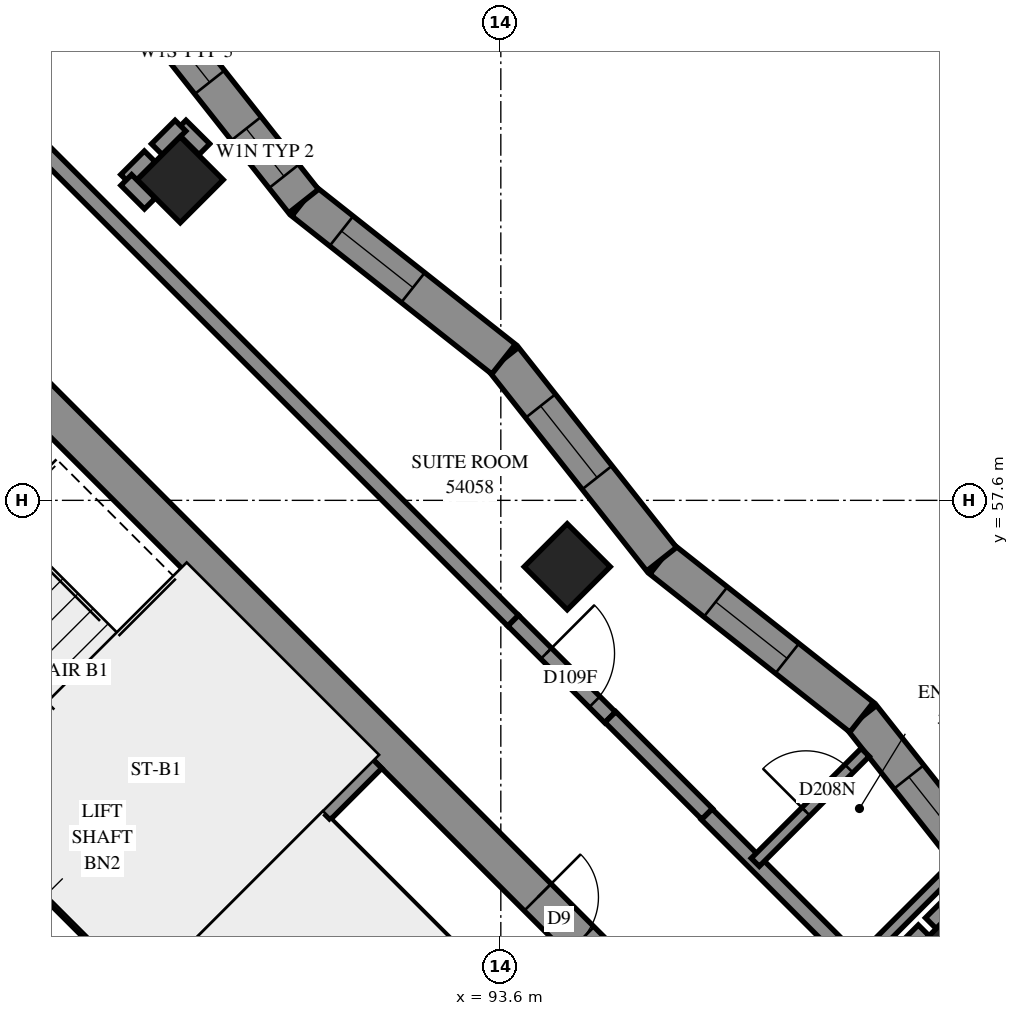
"""IFC4 building model, lengths in metres.
Left out: names, types, materials, properties, quantities, classifications, styles, units other than length and angle.
Written with IfcOpenShell. Run it as: python <this file> out.ifc"""

import sys

from ifc_helpers import new_model, si_unit, direction, frame, frame_2d, origin, origin_2d, place, context, subcontext, project, spatial, polyline, rectangle, outline, extrude, element, fill, save


model = new_model("IFC4")
c1 = context("Model", 3, precision=1e-05, world=origin(), true_north=direction((0.0, 1.0)))
c2 = subcontext(c1, "Body", "Model", "MODEL_VIEW")
j1 = project(units=[si_unit("LENGTHUNIT", "METRE"), si_unit("PLANEANGLEUNIT", "RADIAN")], contexts=[c1])
p1 = place(None, origin())
s1 = spatial("IfcSite", under=j1, at=p1, CompositionType="ELEMENT")
p2 = place(p1, origin())
s2 = spatial("IfcBuilding", under=s1, at=p2, CompositionType="ELEMENT")
p3 = place(p2, frame((0.0, 0.0, 199.8)))
s3 = spatial("IfcBuildingStorey", under=s2, at=p3, CompositionType="ELEMENT", Elevation=199.8)
for number, where, z_axis, x_axis in (
    (1, (89.382, 61.818, 0.0), (0.0, 0.0, 1.0), (0.707, -0.707, 0.0)),
    (2, (94.474, 56.727, 0.0), (0.0, 0.0, 1.0), (0.707, -0.707, 0.0)),
    (3, (99.565, 51.635, 0.0), (0.0, 0.0, 1.0), (0.707, -0.707, 0.0)),
):
    element("IfcColumn", number, at=place(p3, frame(where, z_axis=z_axis, x_axis=x_axis)), inside=s3, PredefinedType="COLUMN", context=c2, shape_type="SweptSolid", body=[
        extrude(rectangle(XDim=0.8, YDim=0.8, at=origin_2d()), origin(), (0.0, 0.0, 1.0), 3.1),
    ])
p4 = place(p3, frame((86.66, 59.802, -0.3), z_axis=(0.0, 0.0, 1.0), x_axis=(0.7071067812, -0.7071067812, 0.0)))
e4 = element("IfcWall", 4, at=p4, inside=s3, PredefinedType="SHEAR", context=c2, shape_type="SweptSolid", body=[
    extrude(rectangle(XDim=15.4, YDim=0.5, at=frame_2d((7.7, 0.0))), origin(), (0.0, 0.0, 1.0), 2.7),
])
p5 = place(p4, frame((10.5, 0.0, 0.3)))
e5 = element("IfcOpeningElement", 5, at=p5, cuts=e4, PredefinedType="OPENING", context=c2, shape_type="SweptSolid", body=[
    extrude(rectangle(XDim=0.8, YDim=2.1, at=frame_2d((0.4, 1.05))), frame((0.0, 0.26, 0.0), z_axis=(0.0, -1.0, 0.0), x_axis=(1.0, 0.0, 0.0)), (0.0, 0.0, 1.0), 0.52),
])
p6 = place(p3, frame((81.534, 53.969, 0.0), z_axis=(0.0, 0.0, 1.0), x_axis=(0.707103309, -0.7071102534, 0.0)))
e6 = element("IfcWall", 6, at=p6, inside=s3, PredefinedType="SOLIDWALL", context=c2, shape_type="SweptSolid", body=[
    extrude(rectangle(XDim=14.4, YDim=0.3, at=frame_2d((7.2, 0.0))), origin(), (0.0, 0.0, 1.0), 3.1),
])
p7 = place(p6, frame((1.25, 0.0, 0.0)))
e7 = element("IfcOpeningElement", 7, at=p7, cuts=e6, PredefinedType="OPENING", context=c2, shape_type="SweptSolid", body=[
    extrude(rectangle(XDim=1.1, YDim=2.1, at=frame_2d((0.55, 1.05))), frame((0.0, 0.16, 0.0), z_axis=(0.0, -1.0, 0.0), x_axis=(1.0, 0.0, 0.0)), (0.0, 0.0, 1.0), 0.32),
])
p8 = place(p6, frame((4.85, 0.0, 0.0)))
e8 = element("IfcOpeningElement", 8, at=p8, cuts=e6, PredefinedType="OPENING", context=c2, shape_type="SweptSolid", body=[
    extrude(rectangle(XDim=1.1, YDim=2.1, at=frame_2d((0.55, 1.05))), frame((0.0, 0.16, 0.0), z_axis=(0.0, -1.0, 0.0), x_axis=(1.0, 0.0, 0.0)), (0.0, 0.0, 1.0), 0.32),
])
p9 = place(p6, frame((8.45, 0.0, 0.0)))
e9 = element("IfcOpeningElement", 9, at=p9, cuts=e6, PredefinedType="OPENING", context=c2, shape_type="SweptSolid", body=[
    extrude(rectangle(XDim=1.1, YDim=2.1, at=frame_2d((0.55, 1.05))), frame((0.0, 0.16, 0.0), z_axis=(0.0, -1.0, 0.0), x_axis=(1.0, 0.0, 0.0)), (0.0, 0.0, 1.0), 0.32),
])
p10 = place(p6, frame((12.05, 0.0, 0.0)))
e10 = element("IfcOpeningElement", 10, at=p10, cuts=e6, PredefinedType="OPENING", context=c2, shape_type="SweptSolid", body=[
    extrude(rectangle(XDim=1.1, YDim=2.1, at=frame_2d((0.55, 1.05))), frame((0.0, 0.16, 0.0), z_axis=(0.0, -1.0, 0.0), x_axis=(1.0, 0.0, 0.0)), (0.0, 0.0, 1.0), 0.32),
])
p11 = place(p3, frame((83.867, 56.302, 0.0), z_axis=(0.0, 0.0, 1.0), x_axis=(0.7071137256, -0.7070998367, 0.0)))
e11 = element("IfcWall", 11, at=p11, inside=s3, PredefinedType="SOLIDWALL", context=c2, shape_type="SweptSolid", body=[
    extrude(rectangle(XDim=7.2, YDim=0.3, at=frame_2d((3.6, 0.0))), origin(), (0.0, 0.0, 1.0), 3.1),
])
p12 = place(p3, frame((88.958, 51.211, 0.0), z_axis=(0.0, 0.0, 1.0), x_axis=(0.7071067812, 0.7071067812, 0.0)))
e12 = element("IfcWall", 12, at=p12, inside=s3, PredefinedType="SOLIDWALL", context=c2, shape_type="SweptSolid", body=[
    extrude(rectangle(XDim=4.2, YDim=0.3, at=frame_2d((2.1, 0.0))), origin(), (0.0, 0.0, 1.0), 3.1),
])
p13 = place(p3, frame((100.439, 52.098, 0.0), z_axis=(0.0, 0.0, 1.0), x_axis=(-0.6198277208, 0.7847379158, 0.0)))
e13 = element("IfcWall", 13, at=p13, inside=s3, PredefinedType="SOLIDWALL", context=c2, shape_type="SweptSolid", body=[
    extrude(outline(polyline([(0.051, -0.25), (3.405, -0.25), (3.346, 0.25), (-0.051, 0.25), (0.051, -0.25)])), origin(), (0.0, 0.0, 1.0), 3.1),
])
p14 = place(p13, frame((1.173, 0.0, 0.45)))
e14 = element("IfcOpeningElement", 14, at=p14, cuts=e13, PredefinedType="OPENING", context=c2, shape_type="SweptSolid", body=[
    extrude(rectangle(XDim=1.2, YDim=2.5, at=frame_2d((0.6, 1.25))), frame((0.0, 0.26, 0.0), z_axis=(0.0, -1.0, 0.0), x_axis=(1.0, 0.0, 0.0)), (0.0, 0.0, 1.0), 0.52),
])
p15 = place(p3, frame((98.347, 54.747, 0.0), z_axis=(0.0, 0.0, 1.0), x_axis=(-0.7847316147, 0.6198356984, 0.0)))
e15 = element("IfcWall", 15, at=p15, inside=s3, PredefinedType="SOLIDWALL", context=c2, shape_type="SweptSolid", body=[
    extrude(outline(polyline([(-0.029, -0.25), (3.324, -0.25), (3.383, 0.25), (0.029, 0.25), (-0.029, -0.25)])), origin(), (0.0, 0.0, 1.0), 3.1),
])
p16 = place(p15, frame((1.248, 0.0, 0.45)))
e16 = element("IfcOpeningElement", 16, at=p16, cuts=e15, PredefinedType="OPENING", context=c2, shape_type="SweptSolid", body=[
    extrude(rectangle(XDim=1.2, YDim=2.5, at=frame_2d((0.6, 1.25))), frame((0.0, 0.26, 0.0), z_axis=(0.0, -1.0, 0.0), x_axis=(1.0, 0.0, 0.0)), (0.0, 0.0, 1.0), 0.52),
])
p17 = place(p3, frame((95.715, 56.826, 0.0), z_axis=(0.0, 0.0, 1.0), x_axis=(-0.6198356984, 0.7847316147, 0.0)))
e17 = element("IfcWall", 17, at=p17, inside=s3, PredefinedType="SOLIDWALL", context=c2, shape_type="SweptSolid", body=[
    extrude(outline(polyline([(0.029, -0.25), (3.383, -0.25), (3.324, 0.25), (-0.029, 0.25), (0.029, -0.25)])), origin(), (0.0, 0.0, 1.0), 3.1),
])
p18 = place(p17, frame((1.369, 0.0, 0.45)))
e18 = element("IfcOpeningElement", 18, at=p18, cuts=e17, PredefinedType="OPENING", context=c2, shape_type="SweptSolid", body=[
    extrude(rectangle(XDim=1.2, YDim=2.5, at=frame_2d((0.6, 1.25))), frame((0.0, 0.26, 0.0), z_axis=(0.0, -1.0, 0.0), x_axis=(1.0, 0.0, 0.0)), (0.0, 0.0, 1.0), 0.52),
])
p19 = place(p3, frame((93.636, 59.458, 0.0), z_axis=(0.0, 0.0, 1.0), x_axis=(-0.7847316147, 0.6198356984, 0.0)))
e19 = element("IfcWall", 19, at=p19, inside=s3, PredefinedType="SOLIDWALL", context=c2, shape_type="SweptSolid", body=[
    extrude(outline(polyline([(-0.029, -0.25), (3.324, -0.25), (3.383, 0.25), (0.029, 0.25), (-0.029, -0.25)])), origin(), (0.0, 0.0, 1.0), 3.1),
])
p20 = place(p19, frame((1.519, 0.0, 0.45)))
e20 = element("IfcOpeningElement", 20, at=p20, cuts=e19, PredefinedType="OPENING", context=c2, shape_type="SweptSolid", body=[
    extrude(rectangle(XDim=1.2, YDim=2.5, at=frame_2d((0.6, 1.25))), frame((0.0, 0.26, 0.0), z_axis=(0.0, -1.0, 0.0), x_axis=(1.0, 0.0, 0.0)), (0.0, 0.0, 1.0), 0.52),
])
p21 = place(p3, frame((91.005, 61.536, 0.0), z_axis=(0.0, 0.0, 1.0), x_axis=(-0.6198356984, 0.7847316147, 0.0)))
e21 = element("IfcWall", 21, at=p21, inside=s3, PredefinedType="SOLIDWALL", context=c2, shape_type="SweptSolid", body=[
    extrude(outline(polyline([(0.029, -0.25), (3.383, -0.25), (3.324, 0.25), (-0.029, 0.25), (0.029, -0.25)])), origin(), (0.0, 0.0, 1.0), 3.1),
])
p22 = place(p21, frame((0.416, 0.0, 0.45)))
e22 = element("IfcOpeningElement", 22, at=p22, cuts=e21, PredefinedType="OPENING", context=c2, shape_type="SweptSolid", body=[
    extrude(rectangle(XDim=0.8, YDim=2.5, at=frame_2d((0.4, 1.25))), frame((0.0, 0.26, 0.0), z_axis=(0.0, -1.0, 0.0), x_axis=(1.0, 0.0, 0.0)), (0.0, 0.0, 1.0), 0.52),
])
p23 = place(p21, frame((1.993, 0.0, 0.45)))
e23 = element("IfcOpeningElement", 23, at=p23, cuts=e21, PredefinedType="OPENING", context=c2, shape_type="SweptSolid", body=[
    extrude(rectangle(XDim=1.0, YDim=2.5, at=frame_2d((0.5, 1.25))), frame((0.0, 0.26, 0.0), z_axis=(0.0, -1.0, 0.0), x_axis=(1.0, 0.0, 0.0)), (0.0, 0.0, 1.0), 0.52),
])
p24 = place(p3, frame((91.313, 53.354, 0.0), z_axis=(0.0, 0.0, 1.0), x_axis=(0.7071067812, -0.7071067812, 0.0)))
e24 = element("IfcWall", 24, at=p24, inside=s3, PredefinedType="PARTITIONING", context=c2, shape_type="SweptSolid", body=[
    extrude(rectangle(XDim=5.95, YDim=0.15, at=frame_2d((2.975, 0.0))), origin(), (0.0, 0.0, 1.0), 3.1),
])
p25 = place(p3, frame((86.835, 62.945, 0.0), z_axis=(0.0, 0.0, 1.0), x_axis=(0.7071067812, -0.7071067812, 0.0)))
e25 = element("IfcWall", 25, at=p25, inside=s3, PredefinedType="PARTITIONING", context=c2, shape_type="SweptSolid", body=[
    extrude(rectangle(XDim=9.798, YDim=0.2, at=frame_2d((4.899, 0.0))), origin(), (0.0, 0.0, 1.0), 3.1),
])
p26 = place(p3, frame((96.309, 53.471, 0.0), z_axis=(0.0, 0.0, 1.0), x_axis=(0.7071067812, -0.7071067812, 0.0)))
e26 = element("IfcWall", 26, at=p26, inside=s3, PredefinedType="PARTITIONING", context=c2, shape_type="SweptSolid", body=[
    extrude(rectangle(XDim=6.2, YDim=0.2, at=frame_2d((3.1, 0.0))), origin(), (0.0, 0.0, 1.0), 3.1),
])
p27 = place(p3, frame((96.948, 52.838, 0.0), z_axis=(0.0, 0.0, 1.0), x_axis=(0.7070823329, 0.7071312287, 0.0)))
e27 = element("IfcWall", 27, at=p27, inside=s3, PredefinedType="PARTITIONING", context=c2, shape_type="SweptSolid", body=[
    extrude(rectangle(XDim=2.045, YDim=0.15, at=frame_2d((1.023, 0.0))), origin(), (0.0, 0.0, 1.0), 3.1),
])
p28 = place(p27, frame((0.943, 0.0, 0.0)))
e28 = element("IfcOpeningElement", 28, at=p28, cuts=e27, PredefinedType="OPENING", context=c2, shape_type="SweptSolid", body=[
    extrude(rectangle(XDim=0.8, YDim=2.1, at=frame_2d((0.4, 1.05))), frame((0.0, 0.085, 0.0), z_axis=(0.0, -1.0, 0.0), x_axis=(1.0, 0.0, 0.0)), (0.0, 0.0, 1.0), 0.17),
])
p29 = place(p3, frame((93.763, 56.017, 0.0), z_axis=(0.0, 0.0, 1.0), x_axis=(0.7076620277, -0.7065510983, 0.0)))
e29 = element("IfcWall", 29, at=p29, inside=s3, PredefinedType="PARTITIONING", context=c2, shape_type="SweptSolid", body=[
    extrude(rectangle(XDim=1.8, YDim=0.2, at=frame_2d((0.9, 0.0))), origin(), (0.0, 0.0, 1.0), 3.1),
])
p30 = place(p29, frame((0.612, 0.0, 0.0)))
e30 = element("IfcOpeningElement", 30, at=p30, cuts=e29, PredefinedType="OPENING", context=c2, shape_type="SweptSolid", body=[
    extrude(rectangle(XDim=0.9, YDim=2.1, at=frame_2d((0.45, 1.05))), frame((0.0, 0.11, 0.0), z_axis=(0.0, -1.0, 0.0), x_axis=(1.0, 0.0, 0.0)), (0.0, 0.0, 1.0), 0.22),
])
p31 = place(p3, frame((95.041, 54.749, 0.0), z_axis=(0.0, 0.0, 1.0), x_axis=(0.7065510983, -0.7076620277, 0.0)))
e31 = element("IfcWall", 31, at=p31, inside=s3, PredefinedType="PARTITIONING", context=c2, shape_type="SweptSolid", body=[
    extrude(rectangle(XDim=1.8, YDim=0.2, at=frame_2d((0.9, 0.0))), origin(), (0.0, 0.0, 1.0), 3.1),
])
p32 = place(p3, frame((98.291, 51.495, 0.0), z_axis=(0.0, 0.0, 1.0), x_axis=(0.7070793404, 0.7071342209, 0.0)))
e32 = element("IfcWall", 32, at=p32, inside=s3, PredefinedType="PARTITIONING", context=c2, shape_type="SweptSolid", body=[
    extrude(rectangle(XDim=1.822, YDim=0.15, at=frame_2d((0.911, 0.0))), origin(), (0.0, 0.0, 1.0), 3.1),
])
p33 = place(p3, frame((89.388, 62.53, 0.0), z_axis=(0.0, 0.0, 1.0), x_axis=(0.7093767693, -0.7048294823, 0.0)))
e33 = element("IfcWall", 33, at=p33, inside=s3, PredefinedType="PARTITIONING", context=c2, shape_type="SweptSolid", body=[
    extrude(rectangle(XDim=0.44, YDim=0.2, at=frame_2d((0.22, 0.0))), origin(), (0.0, 0.0, 1.0), 3.1),
])
for number, where, z_axis, x_axis in (
    (34, (98.853, 51.633, 0.0), (0.0, 0.0, 1.0), (0.707, 0.707, 0.0)),
    (35, (88.671, 61.815, 0.0), (0.0, 0.0, 1.0), (0.707, 0.707, 0.0)),
    (36, (88.672, 61.814, 0.0), (0.0, 0.0, 1.0), (0.707, -0.707, 0.0)),
    (37, (89.075, 62.219, 0.0), (0.0, 0.0, 1.0), (0.707, 0.707, 0.0)),
):
    element("IfcWall", number, at=place(p3, frame(where, z_axis=z_axis, x_axis=x_axis)), inside=s3, PredefinedType="PARTITIONING", context=c2, shape_type="SweptSolid", body=[
        extrude(rectangle(XDim=0.438, YDim=0.2, at=frame_2d((0.219, 0.0))), origin(), (0.0, 0.0, 1.0), 3.1),
    ])
p34 = place(p3, frame((99.257, 52.037, 0.0), z_axis=(0.0, 0.0, 1.0), x_axis=(0.7071067812, 0.7071067812, 0.0)))
e38 = element("IfcWall", 38, at=p34, inside=s3, PredefinedType="PARTITIONING", context=c2, shape_type="SweptSolid", body=[
    extrude(rectangle(XDim=0.721, YDim=0.2, at=frame_2d((0.36, 0.0))), origin(), (0.0, 0.0, 1.0), 3.1),
])
p35 = place(p14, origin())
e39 = element("IfcWindow", 39, at=p35, inside=s3, PartitioningType="SINGLE_PANEL", PredefinedType="WINDOW", context=c2, shape_type="SweptSolid", body=[
    extrude(rectangle(XDim=1.2, YDim=2.5, at=frame_2d((0.6, 1.25))), frame((0.0, 0.18, 0.0), z_axis=(0.0, -1.0, 0.0), x_axis=(1.0, 0.0, 0.0)), (0.0, 0.0, 1.0), 0.06),
])
fill(e14, e39)
p36 = place(p16, origin())
e40 = element("IfcWindow", 40, at=p36, inside=s3, PartitioningType="SINGLE_PANEL", PredefinedType="WINDOW", context=c2, shape_type="SweptSolid", body=[
    extrude(rectangle(XDim=1.2, YDim=2.5, at=frame_2d((0.6, 1.25))), frame((0.0, 0.18, 0.0), z_axis=(0.0, -1.0, 0.0), x_axis=(1.0, 0.0, 0.0)), (0.0, 0.0, 1.0), 0.06),
])
fill(e16, e40)
p37 = place(p18, origin())
e41 = element("IfcWindow", 41, at=p37, inside=s3, PartitioningType="SINGLE_PANEL", PredefinedType="WINDOW", context=c2, shape_type="SweptSolid", body=[
    extrude(rectangle(XDim=1.2, YDim=2.5, at=frame_2d((0.6, 1.25))), frame((0.0, 0.18, 0.0), z_axis=(0.0, -1.0, 0.0), x_axis=(1.0, 0.0, 0.0)), (0.0, 0.0, 1.0), 0.06),
])
fill(e18, e41)
p38 = place(p20, origin())
e42 = element("IfcWindow", 42, at=p38, inside=s3, PartitioningType="SINGLE_PANEL", PredefinedType="WINDOW", context=c2, shape_type="SweptSolid", body=[
    extrude(rectangle(XDim=1.2, YDim=2.5, at=frame_2d((0.6, 1.25))), frame((0.0, 0.18, 0.0), z_axis=(0.0, -1.0, 0.0), x_axis=(1.0, 0.0, 0.0)), (0.0, 0.0, 1.0), 0.06),
])
fill(e20, e42)
p39 = place(p5, origin())
e43 = element("IfcDoor", 43, at=p39, inside=s3, OperationType="SINGLE_SWING_RIGHT", PredefinedType="DOOR", context=c2, shape_type="SweptSolid", body=[
    extrude(rectangle(XDim=0.8, YDim=2.1, at=frame_2d((0.4, 1.05))), frame((0.0, 0.025, 0.0), z_axis=(0.0, -1.0, 0.0), x_axis=(1.0, 0.0, 0.0)), (0.0, 0.0, 1.0), 0.05),
])
fill(e5, e43)
p40 = place(p30, origin())
e44 = element("IfcDoor", 44, at=p40, inside=s3, OperationType="SINGLE_SWING_LEFT", PredefinedType="DOOR", context=c2, shape_type="SweptSolid", body=[
    extrude(rectangle(XDim=0.9, YDim=2.1, at=frame_2d((0.45, 1.05))), frame((0.0, 0.025, 0.0), z_axis=(0.0, -1.0, 0.0), x_axis=(1.0, 0.0, 0.0)), (0.0, 0.0, 1.0), 0.05),
])
fill(e30, e44)
p41 = place(p28, origin())
e45 = element("IfcDoor", 45, at=p41, inside=s3, OperationType="SINGLE_SWING_RIGHT", PredefinedType="DOOR", context=c2, shape_type="SweptSolid", body=[
    extrude(rectangle(XDim=0.8, YDim=2.1, at=frame_2d((0.4, 1.05))), frame((0.0, 0.025, 0.0), z_axis=(0.0, -1.0, 0.0), x_axis=(1.0, 0.0, 0.0)), (0.0, 0.0, 1.0), 0.05),
])
fill(e28, e45)
p42 = place(p22, origin())
e46 = element("IfcWindow", 46, at=p42, inside=s3, PartitioningType="SINGLE_PANEL", PredefinedType="WINDOW", context=c2, shape_type="SweptSolid", body=[
    extrude(rectangle(XDim=0.8, YDim=2.5, at=frame_2d((0.4, 1.25))), frame((0.0, 0.18, 0.0), z_axis=(0.0, -1.0, 0.0), x_axis=(1.0, 0.0, 0.0)), (0.0, 0.0, 1.0), 0.06),
])
fill(e22, e46)
p43 = place(p23, origin())
e47 = element("IfcWindow", 47, at=p43, inside=s3, PartitioningType="SINGLE_PANEL", PredefinedType="WINDOW", context=c2, shape_type="SweptSolid", body=[
    extrude(rectangle(XDim=1.0, YDim=2.5, at=frame_2d((0.5, 1.25))), frame((0.0, 0.18, 0.0), z_axis=(0.0, -1.0, 0.0), x_axis=(1.0, 0.0, 0.0)), (0.0, 0.0, 1.0), 0.06),
])
fill(e23, e47)
save(model, sys.argv[1])
